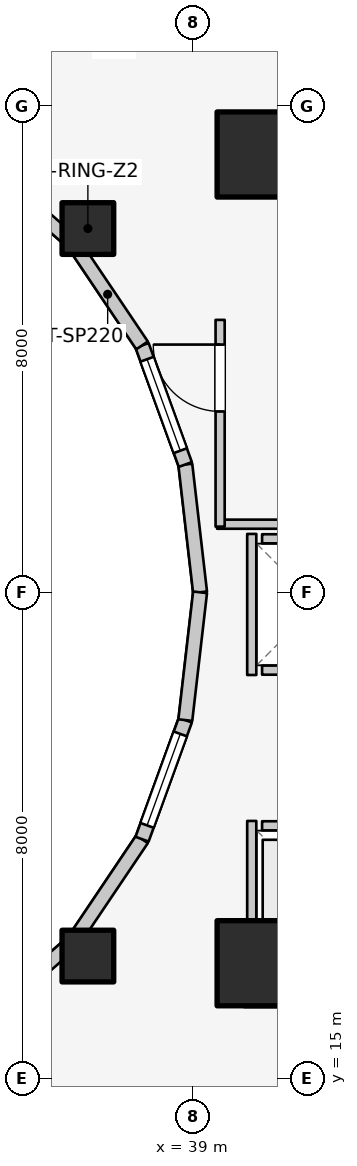
"""IFC4 building model, lengths in metres.
Left out: names, types, materials, properties, quantities, classifications, styles, units other than length and angle.
Written with IfcOpenShell. Run it as: python <this file> out.ifc"""

import sys

from ifc_helpers import new_model, si_unit, direction, frame, frame_2d, origin, origin_2d, place, context, subcontext, project, spatial, rectangle, extrude, element, fill, save


model = new_model("IFC4")
c1 = context("Model", 3, precision=1e-05, world=origin(), true_north=direction((0.0, 1.0)))
c2 = subcontext(c1, "Body", "Model", "MODEL_VIEW")
j1 = project(units=[si_unit("LENGTHUNIT", "METRE"), si_unit("PLANEANGLEUNIT", "RADIAN")], contexts=[c1])
p1 = place(None, origin())
s1 = spatial("IfcSite", under=j1, at=p1, CompositionType="ELEMENT")
p2 = place(p1, origin())
s2 = spatial("IfcBuilding", under=s1, at=p2, CompositionType="ELEMENT")
p3 = place(p2, frame((0.0, 0.0, 107.3)))
s3 = spatial("IfcBuildingStorey", under=s2, at=p3, CompositionType="ELEMENT", Elevation=107.3)
for number, where, z_axis, x_axis in (
    (1, (39.85, 16.55, 0.0), (0.0, 0.0, 1.0), (1.0, 0.0, 0.0)),
    (2, (39.85, 30.35, 0.0), (0.0, 0.0, 1.0), (1.0, 0.0, 0.0)),
):
    element("IfcWall", number, at=place(p3, frame(where, z_axis=z_axis, x_axis=x_axis)), inside=s3, PredefinedType="SHEAR", context=c2, shape_type="SweptSolid", body=[
        extrude(rectangle(XDim=4.5, YDim=0.7, at=frame_2d((2.25, 0.0))), origin(), (0.0, 0.0, 1.0), 3.1),
    ])
for number, where, z_axis, x_axis in (
    (3, (40.1, 16.9, 0.0), (0.0, 0.0, 1.0), (1.0, 0.0, 0.0)),
    (4, (40.1, 30.2, 0.0), (0.0, 0.0, 1.0), (1.0, 0.0, 0.0)),
):
    element("IfcColumn", number, at=place(p3, frame(where, z_axis=z_axis, x_axis=x_axis)), inside=s3, PredefinedType="COLUMN", context=c2, shape_type="SweptSolid", body=[
        extrude(rectangle(XDim=1.4, YDim=1.4, at=origin_2d()), origin(), (0.0, 0.0, 1.0), 3.1),
    ])
for number, where, z_axis, x_axis in (
    (5, (37.275, 28.982, 0.0), (0.0, 0.0, 1.0), (1.0, 0.0, 0.0)),
    (6, (37.275, 17.018, 0.0), (0.0, 0.0, 1.0), (1.0, 0.0, 0.0)),
):
    element("IfcColumn", number, at=place(p3, frame(where, z_axis=z_axis, x_axis=x_axis)), inside=s3, PredefinedType="COLUMN", context=c2, shape_type="SweptSolid", body=[
        extrude(rectangle(XDim=0.85, YDim=0.85, at=origin_2d()), origin(), (0.0, 0.0, 1.0), 3.1),
    ])
p4 = place(p3, frame((39.12, 23.0, 0.0), z_axis=(0.0, 0.0, 1.0), x_axis=(-0.114711713601, 0.993398823617, 0.0)))
e7 = element("IfcWall", 7, at=p4, inside=s3, PredefinedType="STANDARD", context=c2, shape_type="SweptSolid", body=[
    extrude(rectangle(XDim=2.115, YDim=0.23, at=frame_2d((1.058, 0.0))), origin(), (0.0, 0.0, 1.0), 2.84),
])
p5 = place(p3, frame((38.877, 25.102, 0.0), z_axis=(0.0, 0.0, 1.0), x_axis=(-0.341423187295, 0.93990968033, 0.0)))
e8 = element("IfcWall", 8, at=p5, inside=s3, PredefinedType="STANDARD", context=c2, shape_type="SweptSolid", body=[
    extrude(rectangle(XDim=2.084, YDim=0.23, at=frame_2d((1.042, 0.0))), origin(), (0.0, 0.0, 1.0), 2.84),
])
p6 = place(p5, frame((0.242, 0.0, 0.85)))
e9 = element("IfcOpeningElement", 9, at=p6, cuts=e8, PredefinedType="OPENING", context=c2, shape_type="SweptSolid", body=[
    extrude(rectangle(XDim=1.6, YDim=1.65, at=frame_2d((0.8, 0.825))), frame((0.0, 0.125, 0.0), z_axis=(0.0, -1.0, 0.0), x_axis=(1.0, 0.0, 0.0)), (0.0, 0.0, 1.0), 0.25),
])
p7 = place(p3, frame((38.166, 27.06, 0.0), z_axis=(0.0, 0.0, 1.0), x_axis=(-0.558197800898, 0.829707909492, 0.0)))
e10 = element("IfcWall", 10, at=p7, inside=s3, PredefinedType="STANDARD", context=c2, shape_type="SweptSolid", body=[
    extrude(rectangle(XDim=2.027, YDim=0.23, at=frame_2d((1.013, 0.0))), origin(), (0.0, 0.0, 1.0), 2.16),
])
for number, where, z_axis, x_axis in (
    (11, (37.035, 28.742, 0.0), (0.0, 0.0, 1.0), (-0.753, 0.659, 0.0)),
    (12, (35.56, 15.968, 0.0), (0.0, 0.0, 1.0), (0.753, 0.659, 0.0)),
):
    element("IfcWall", number, at=place(p3, frame(where, z_axis=z_axis, x_axis=x_axis)), inside=s3, PredefinedType="STANDARD", context=c2, shape_type="SweptSolid", body=[
        extrude(rectangle(XDim=1.959, YDim=0.23, at=frame_2d((0.98, 0.0))), origin(), (0.0, 0.0, 1.0), 2.16),
    ])
p8 = place(p3, frame((37.035, 17.258, 0.0), z_axis=(0.0, 0.0, 1.0), x_axis=(0.558197800898, 0.829707909492, 0.0)))
e13 = element("IfcWall", 13, at=p8, inside=s3, PredefinedType="STANDARD", context=c2, shape_type="SweptSolid", body=[
    extrude(rectangle(XDim=2.027, YDim=0.23, at=frame_2d((1.013, 0.0))), origin(), (0.0, 0.0, 1.0), 2.16),
])
p9 = place(p3, frame((38.166, 18.94, 0.0), z_axis=(0.0, 0.0, 1.0), x_axis=(0.341423187295, 0.93990968033, 0.0)))
e14 = element("IfcWall", 14, at=p9, inside=s3, PredefinedType="STANDARD", context=c2, shape_type="SweptSolid", body=[
    extrude(rectangle(XDim=2.084, YDim=0.23, at=frame_2d((1.042, 0.0))), origin(), (0.0, 0.0, 1.0), 2.84),
])
p10 = place(p9, frame((0.242, 0.0, 0.85)))
e15 = element("IfcOpeningElement", 15, at=p10, cuts=e14, PredefinedType="OPENING", context=c2, shape_type="SweptSolid", body=[
    extrude(rectangle(XDim=1.6, YDim=1.65, at=frame_2d((0.8, 0.825))), frame((0.0, 0.125, 0.0), z_axis=(0.0, -1.0, 0.0), x_axis=(1.0, 0.0, 0.0)), (0.0, 0.0, 1.0), 0.25),
])
p11 = place(p3, frame((38.877, 20.898, 0.0), z_axis=(0.0, 0.0, 1.0), x_axis=(0.114711713601, 0.993398823617, 0.0)))
e16 = element("IfcWall", 16, at=p11, inside=s3, PredefinedType="STANDARD", context=c2, shape_type="SweptSolid", body=[
    extrude(rectangle(XDim=2.115, YDim=0.23, at=frame_2d((1.058, 0.0))), origin(), (0.0, 0.0, 1.0), 2.84),
])
p12 = place(p3, frame((40.14, 19.16, 0.0), z_axis=(0.0, 0.0, 1.0), x_axis=(1.0, 0.0, 0.0)))
e17 = element("IfcWall", 17, at=p12, inside=s3, PredefinedType="SOLIDWALL", context=c2, shape_type="SweptSolid", body=[
    extrude(rectangle(XDim=1.82, YDim=0.15, at=frame_2d((0.91, 0.0))), origin(), (0.0, 0.0, 1.0), 2.12),
])
p13 = place(p12, frame((0.36, 0.0, 0.0)))
e18 = element("IfcOpeningElement", 18, at=p13, cuts=e17, PredefinedType="OPENING", context=c2, shape_type="SweptSolid", body=[
    extrude(rectangle(XDim=1.1, YDim=2.1, at=frame_2d((0.55, 1.05))), frame((0.0, 0.085, 0.0), z_axis=(0.0, -1.0, 0.0), x_axis=(1.0, 0.0, 0.0)), (0.0, 0.0, 1.0), 0.17),
])
p14 = place(p3, frame((40.14, 17.1, 0.0), z_axis=(0.0, 0.0, 1.0), x_axis=(1.0, 0.0, 0.0)))
e19 = element("IfcWall", 19, at=p14, inside=s3, PredefinedType="SOLIDWALL", context=c2, shape_type="SweptSolid", body=[
    extrude(rectangle(XDim=1.82, YDim=0.15, at=frame_2d((0.91, 0.0))), origin(), (0.0, 0.0, 1.0), 2.12),
])
p15 = place(p3, frame((39.97, 17.02, 0.0), z_axis=(0.0, 0.0, 1.0), x_axis=(0.0, 1.0, 0.0)))
e20 = element("IfcWall", 20, at=p15, inside=s3, PredefinedType="SOLIDWALL", context=c2, shape_type="SweptSolid", body=[
    extrude(rectangle(XDim=2.22, YDim=0.15, at=frame_2d((1.11, 0.0))), origin(), (0.0, 0.0, 1.0), 2.12),
])
for number, where, z_axis, x_axis in (
    (21, (40.14, 21.72, 0.0), (0.0, 0.0, 1.0), (1.0, 0.0, 0.0)),
    (22, (40.14, 23.88, 0.0), (0.0, 0.0, 1.0), (1.0, 0.0, 0.0)),
):
    element("IfcWall", number, at=place(p3, frame(where, z_axis=z_axis, x_axis=x_axis)), inside=s3, PredefinedType="SOLIDWALL", context=c2, shape_type="SweptSolid", body=[
        extrude(rectangle(XDim=1.82, YDim=0.15, at=frame_2d((0.91, 0.0))), origin(), (0.0, 0.0, 1.0), 2.12),
    ])
p16 = place(p3, frame((39.97, 21.64, 0.0), z_axis=(0.0, 0.0, 1.0), x_axis=(0.0, 1.0, 0.0)))
e23 = element("IfcWall", 23, at=p16, inside=s3, PredefinedType="SOLIDWALL", context=c2, shape_type="SweptSolid", body=[
    extrude(rectangle(XDim=2.32, YDim=0.15, at=frame_2d((1.16, 0.0))), origin(), (0.0, 0.0, 1.0), 2.12),
])
p17 = place(p3, frame((39.4, 24.12, 0.0), z_axis=(0.0, 0.0, 1.0), x_axis=(1.0, 0.0, 0.0)))
e24 = element("IfcWall", 24, at=p17, inside=s3, PredefinedType="PARTITIONING", context=c2, shape_type="SweptSolid", body=[
    extrude(rectangle(XDim=5.08, YDim=0.15, at=frame_2d((2.54, 0.0))), origin(), (0.0, 0.0, 1.0), 2.12),
])
p18 = place(p3, frame((39.45, 24.08, 0.0), z_axis=(0.0, 0.0, 1.0), x_axis=(0.0, 1.0, 0.0)))
e25 = element("IfcWall", 25, at=p18, inside=s3, PredefinedType="PARTITIONING", context=c2, shape_type="SweptSolid", body=[
    extrude(rectangle(XDim=3.4, YDim=0.15, at=frame_2d((1.7, 0.0))), origin(), (0.0, 0.0, 1.0), 2.855),
])
p19 = place(p18, frame((1.894, 0.0, 0.0)))
e26 = element("IfcOpeningElement", 26, at=p19, cuts=e25, PredefinedType="OPENING", context=c2, shape_type="SweptSolid", body=[
    extrude(rectangle(XDim=1.1, YDim=2.1, at=frame_2d((0.55, 1.05))), frame((0.0, 0.085, 0.0), z_axis=(0.0, -1.0, 0.0), x_axis=(1.0, 0.0, 0.0)), (0.0, 0.0, 1.0), 0.17),
])
p20 = place(p6, origin())
e27 = element("IfcWindow", 27, at=p20, inside=s3, PartitioningType="SINGLE_PANEL", PredefinedType="WINDOW", context=c2, shape_type="SweptSolid", body=[
    extrude(rectangle(XDim=1.6, YDim=1.65, at=frame_2d((0.8, 0.825))), frame((0.0, 0.03, 0.0), z_axis=(0.0, -1.0, 0.0), x_axis=(1.0, 0.0, 0.0)), (0.0, 0.0, 1.0), 0.06),
])
fill(e9, e27)
p21 = place(p10, origin())
e28 = element("IfcWindow", 28, at=p21, inside=s3, PartitioningType="SINGLE_PANEL", PredefinedType="WINDOW", context=c2, shape_type="SweptSolid", body=[
    extrude(rectangle(XDim=1.6, YDim=1.65, at=frame_2d((0.8, 0.825))), frame((0.0, 0.03, 0.0), z_axis=(0.0, -1.0, 0.0), x_axis=(1.0, 0.0, 0.0)), (0.0, 0.0, 1.0), 0.06),
])
fill(e15, e28)
p22 = place(p19, origin())
e29 = element("IfcDoor", 29, at=p22, inside=s3, OperationType="SINGLE_SWING_RIGHT", PredefinedType="DOOR", context=c2, shape_type="SweptSolid", body=[
    extrude(rectangle(XDim=1.1, YDim=2.1, at=frame_2d((0.55, 1.05))), frame((0.0, 0.025, 0.0), z_axis=(0.0, -1.0, 0.0), x_axis=(1.0, 0.0, 0.0)), (0.0, 0.0, 1.0), 0.05),
])
fill(e26, e29)
save(model, sys.argv[1])
